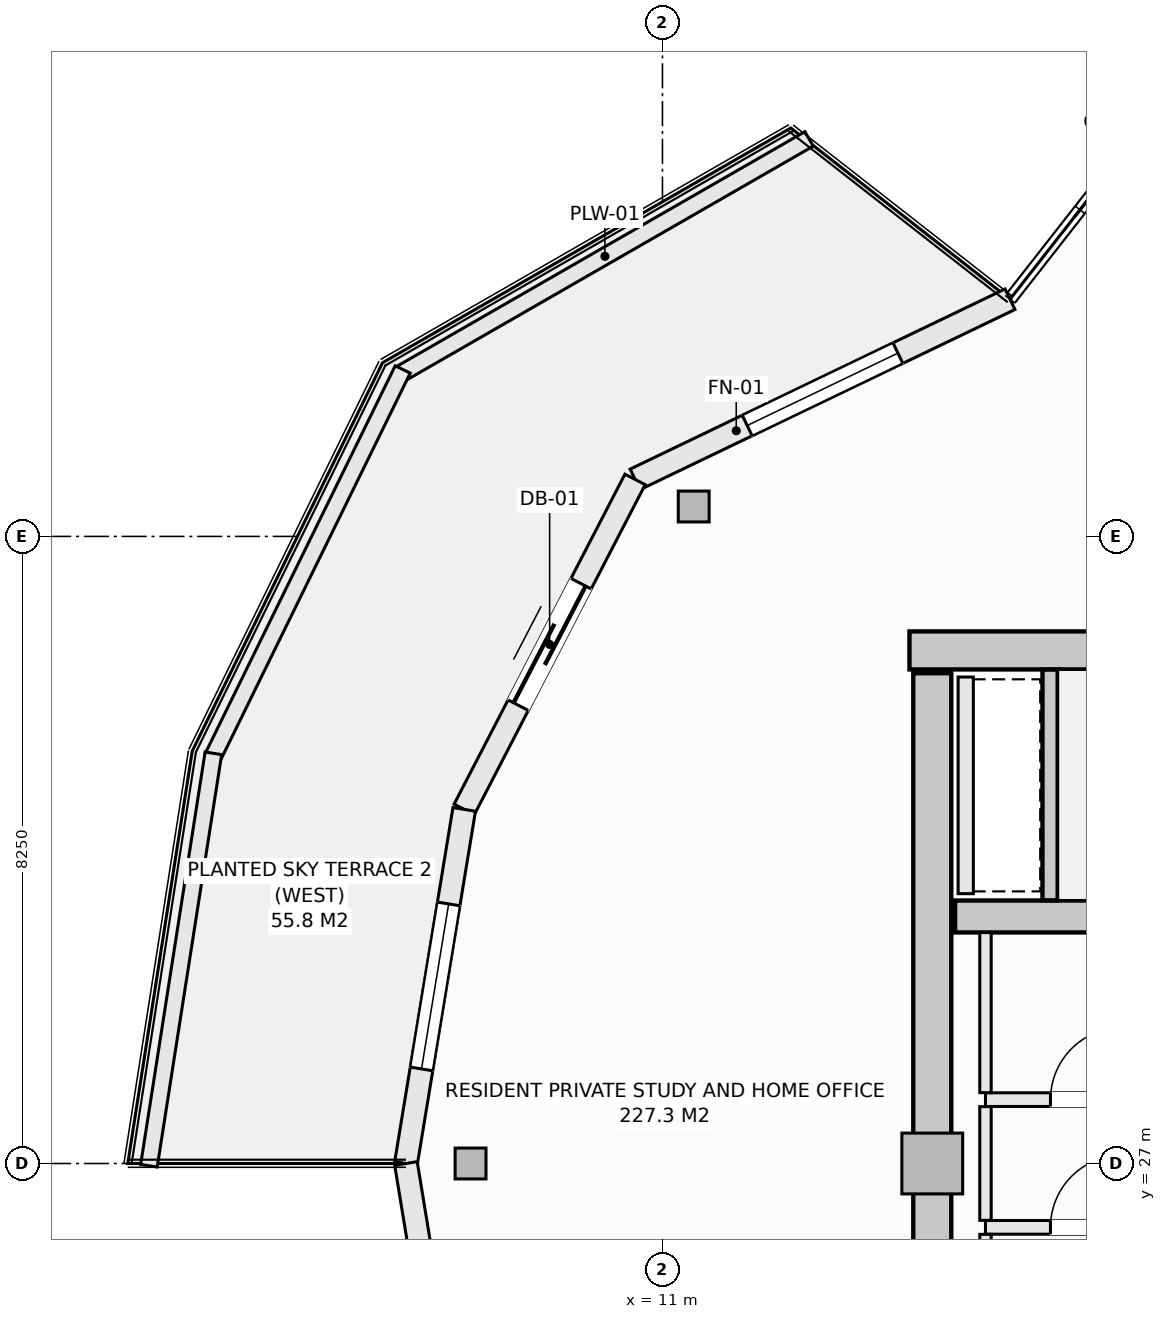
"""IFC4 building model, lengths in metres.
Left out: names, types, materials, properties, quantities, classifications, styles, units other than length and angle.
Written with IfcOpenShell. Run it as: python <this file> out.ifc"""

import sys

from ifc_helpers import new_model, si_unit, direction, frame, frame_2d, origin, origin_2d, place, context, subcontext, project, spatial, rectangle, hollow_rectangle, extrude, element, fill, save


model = new_model("IFC4")
c1 = context("Model", 3, precision=1e-05, world=origin(), true_north=direction((0.0, 1.0)))
c2 = subcontext(c1, "Body", "Model", "MODEL_VIEW")
j1 = project(units=[si_unit("LENGTHUNIT", "METRE"), si_unit("PLANEANGLEUNIT", "RADIAN")], contexts=[c1])
p1 = place(None, origin())
s1 = spatial("IfcSite", under=j1, at=p1, CompositionType="ELEMENT")
p2 = place(p1, origin())
s2 = spatial("IfcBuilding", under=s1, at=p2, CompositionType="ELEMENT")
p3 = place(p2, frame((0.0, 0.0, 245.9)))
s3 = spatial("IfcBuildingStorey", under=s2, at=p3, CompositionType="ELEMENT", Elevation=245.9)
p4 = place(p3, frame((14.25, 33.75, -0.27), z_axis=(0.0, 0.0, 1.0), x_axis=(1.0, 0.0, 0.0)))
e1 = element("IfcWall", 1, at=p4, inside=s3, PredefinedType="SHEAR", context=c2, shape_type="SweptSolid", body=[
    extrude(rectangle(XDim=13.5, YDim=0.5, at=frame_2d((6.75, 0.0))), origin(), (0.0, 0.0, 1.0), 3.3),
])
p5 = place(p3, frame((14.55, 20.55, -0.27), z_axis=(0.0, 0.0, 1.0), x_axis=(0.0, 1.0, 0.0)))
e2 = element("IfcWall", 2, at=p5, inside=s3, PredefinedType="SHEAR", context=c2, shape_type="SweptSolid", body=[
    extrude(rectangle(XDim=12.9, YDim=0.5, at=frame_2d((6.45, 0.0))), origin(), (0.0, 0.0, 1.0), 3.3),
])
p6 = place(p3, frame((14.85, 30.25, -0.27), z_axis=(0.0, 0.0, 1.0), x_axis=(1.0, 0.0, 0.0)))
e3 = element("IfcWall", 3, at=p6, inside=s3, PredefinedType="SHEAR", context=c2, shape_type="SweptSolid", body=[
    extrude(rectangle(XDim=7.3, YDim=0.42, at=frame_2d((3.65, 0.0))), origin(), (0.0, 0.0, 1.0), 3.3),
])
for number, where, z_axis, x_axis in (
    (4, (11.411, 35.644, -0.27), (0.0, 0.0, 1.0), (1.0, 0.0, 0.0)),
    (5, (8.475, 27.0, -0.27), (0.0, 0.0, 1.0), (1.0, 0.0, 0.0)),
):
    element("IfcColumn", number, at=place(p3, frame(where, z_axis=z_axis, x_axis=x_axis)), inside=s3, PredefinedType="COLUMN", context=c2, shape_type="SweptSolid", body=[
        extrude(hollow_rectangle(XDim=0.406, YDim=0.406, WallThickness=0.016, at=origin_2d()), origin(), (0.0, 0.0, 1.0), 3.3),
    ])
p7 = place(p3, frame((14.55, 27.0, -0.27), z_axis=(0.0, 0.0, 1.0), x_axis=(1.0, 0.0, 0.0)))
e6 = element("IfcColumn", 6, at=p7, inside=s3, PredefinedType="PILASTER", context=c2, shape_type="SweptSolid", body=[
    extrude(rectangle(XDim=0.8, YDim=0.8, at=origin_2d()), origin(), (0.0, 0.0, 1.0), 3.3),
])
p8 = place(p3, frame((10.639, 36.0, 0.0), z_axis=(0.0, 0.0, 1.0), x_axis=(0.901355238351, 0.433080517106, 0.0)))
e7 = element("IfcWall", 7, at=p8, inside=s3, PredefinedType="SOLIDWALL", context=c2, shape_type="SweptSolid", body=[
    extrude(rectangle(XDim=5.473, YDim=0.3, at=frame_2d((2.737, 0.0))), origin(), (0.0, 0.0, 1.0), 2.605),
])
p9 = place(p8, frame((1.637, 0.0, 0.72)))
e8 = element("IfcOpeningElement", 8, at=p9, cuts=e7, PredefinedType="OPENING", context=c2, shape_type="SweptSolid", body=[
    extrude(rectangle(XDim=2.2, YDim=1.65, at=frame_2d((1.1, 0.825))), frame((0.0, 0.16, 0.0), z_axis=(0.0, -1.0, 0.0), x_axis=(1.0, 0.0, 0.0)), (0.0, 0.0, 1.0), 0.32),
])
p10 = place(p3, frame((8.392, 31.659, 0.0), z_axis=(0.0, 0.0, 1.0), x_axis=(0.459793771602, 0.888025724625, 0.0)))
e9 = element("IfcWall", 9, at=p10, inside=s3, PredefinedType="SOLIDWALL", context=c2, shape_type="SweptSolid", body=[
    extrude(rectangle(XDim=4.889, YDim=0.3, at=frame_2d((2.444, 0.0))), origin(), (0.0, 0.0, 1.0), 2.605),
])
p11 = place(p10, frame((1.544, 0.0, 0.0)))
e10 = element("IfcOpeningElement", 10, at=p11, cuts=e9, PredefinedType="OPENING", context=c2, shape_type="SweptSolid", body=[
    extrude(rectangle(XDim=1.8, YDim=2.25, at=frame_2d((0.9, 1.125))), frame((0.0, 0.16, 0.0), z_axis=(0.0, -1.0, 0.0), x_axis=(1.0, 0.0, 0.0)), (0.0, 0.0, 1.0), 0.32),
])
p12 = place(p3, frame((7.625, 27.0, 0.0), z_axis=(0.0, 0.0, 1.0), x_axis=(0.162369371657, 0.986730047758, 0.0)))
e11 = element("IfcWall", 11, at=p12, inside=s3, PredefinedType="SOLIDWALL", context=c2, shape_type="SweptSolid", body=[
    extrude(rectangle(XDim=4.721, YDim=0.3, at=frame_2d((2.361, 0.0))), origin(), (0.0, 0.0, 1.0), 2.605),
])
p13 = place(p12, frame((1.261, 0.0, 0.72)))
e12 = element("IfcOpeningElement", 12, at=p13, cuts=e11, PredefinedType="OPENING", context=c2, shape_type="SweptSolid", body=[
    extrude(rectangle(XDim=2.2, YDim=1.65, at=frame_2d((1.1, 0.825))), frame((0.0, 0.16, 0.0), z_axis=(0.0, -1.0, 0.0), x_axis=(1.0, 0.0, 0.0)), (0.0, 0.0, 1.0), 0.32),
])
p14 = place(p3, frame((7.625, 27.0, 0.0), z_axis=(0.0, 0.0, 1.0), x_axis=(0.162369371657, -0.986730047758, 0.0)))
e13 = element("IfcWall", 13, at=p14, inside=s3, PredefinedType="SOLIDWALL", context=c2, shape_type="SweptSolid", body=[
    extrude(rectangle(XDim=4.721, YDim=0.3, at=frame_2d((2.361, 0.0))), origin(), (0.0, 0.0, 1.0), 2.605),
])
p15 = place(p14, frame((1.261, 0.0, 0.72)))
e14 = element("IfcOpeningElement", 14, at=p15, cuts=e13, PredefinedType="OPENING", context=c2, shape_type="SweptSolid", body=[
    extrude(rectangle(XDim=2.2, YDim=1.65, at=frame_2d((1.1, 0.825))), frame((0.0, 0.16, 0.0), z_axis=(0.0, -1.0, 0.0), x_axis=(1.0, 0.0, 0.0)), (0.0, 0.0, 1.0), 0.32),
])
p16 = place(p3, frame((7.557, 37.391, 0.0), z_axis=(0.0, 0.0, 1.0), x_axis=(0.866901621005, 0.49847926687, 0.0)))
e15 = element("IfcWall", 15, at=p16, inside=s3, PredefinedType="PARAPET", context=c2, shape_type="SweptSolid", body=[
    extrude(rectangle(XDim=6.197, YDim=0.22, at=frame_2d((3.098, 0.0))), origin(), (0.0, 0.0, 1.0), 0.52),
])
p17 = place(p3, frame((5.079, 32.338, 0.0), z_axis=(0.0, 0.0, 1.0), x_axis=(0.440058847499, 0.897968936399, 0.0)))
e16 = element("IfcWall", 16, at=p17, inside=s3, PredefinedType="PARAPET", context=c2, shape_type="SweptSolid", body=[
    extrude(rectangle(XDim=5.689, YDim=0.22, at=frame_2d((2.845, 0.0))), origin(), (0.0, 0.0, 1.0), 0.52),
])
p18 = place(p3, frame((4.243, 26.971, 0.0), z_axis=(0.0, 0.0, 1.0), x_axis=(0.154441975483, 0.988001860428, 0.0)))
e17 = element("IfcWall", 17, at=p18, inside=s3, PredefinedType="PARAPET", context=c2, shape_type="SweptSolid", body=[
    extrude(rectangle(XDim=5.492, YDim=0.22, at=frame_2d((2.746, 0.0))), origin(), (0.0, 0.0, 1.0), 0.52),
])
p19 = place(p3, frame((16.1, 30.462, -0.27), z_axis=(0.0, 0.0, 1.0), x_axis=(0.0, 1.0, 0.0)))
e18 = element("IfcWall", 18, at=p19, inside=s3, PredefinedType="SHEAR", context=c2, shape_type="SweptSolid", body=[
    extrude(rectangle(XDim=3.036, YDim=0.2, at=frame_2d((1.518, 0.0))), origin(), (0.0, 0.0, 1.0), 3.3),
])
p20 = place(p3, frame((14.99, 30.55, 0.0), z_axis=(0.0, 0.0, 1.0), x_axis=(0.0, 1.0, 0.0)))
e19 = element("IfcWall", 19, at=p20, inside=s3, PredefinedType="SOLIDWALL", context=c2, shape_type="SweptSolid", body=[
    extrude(rectangle(XDim=2.85, YDim=0.2, at=frame_2d((1.425, 0.0))), origin(), (0.0, 0.0, 1.0), 3.03),
])
p21 = place(p3, frame((15.25, 27.84, 0.0), z_axis=(0.0, 0.0, 1.0), x_axis=(1.0, 0.0, 0.0)))
e20 = element("IfcWall", 20, at=p21, inside=s3, PredefinedType="SOLIDWALL", context=c2, shape_type="SweptSolid", body=[
    extrude(rectangle(XDim=6.9, YDim=0.18, at=frame_2d((3.45, 0.0))), origin(), (0.0, 0.0, 1.0), 3.03),
])
p22 = place(p21, frame((5.02, 0.0, 0.0)))
e21 = element("IfcOpeningElement", 21, at=p22, cuts=e20, PredefinedType="OPENING", context=c2, shape_type="SweptSolid", body=[
    extrude(rectangle(XDim=0.95, YDim=2.1, at=frame_2d((0.475, 1.05))), frame((0.0, 0.1, 0.0), z_axis=(0.0, -1.0, 0.0), x_axis=(1.0, 0.0, 0.0)), (0.0, 0.0, 1.0), 0.2),
])
p23 = place(p21, frame((0.855, 0.0, 0.0)))
e22 = element("IfcOpeningElement", 22, at=p23, cuts=e20, PredefinedType="OPENING", context=c2, shape_type="SweptSolid", body=[
    extrude(rectangle(XDim=0.95, YDim=2.1, at=frame_2d((0.475, 1.05))), frame((0.0, 0.1, 0.0), z_axis=(0.0, -1.0, 0.0), x_axis=(1.0, 0.0, 0.0)), (0.0, 0.0, 1.0), 0.2),
])
p24 = place(p21, frame((2.9, 0.0, 0.0)))
e23 = element("IfcOpeningElement", 23, at=p24, cuts=e20, PredefinedType="OPENING", context=c2, shape_type="SweptSolid", body=[
    extrude(rectangle(XDim=0.95, YDim=2.1, at=frame_2d((0.475, 1.05))), frame((0.0, 0.1, 0.0), z_axis=(0.0, -1.0, 0.0), x_axis=(1.0, 0.0, 0.0)), (0.0, 0.0, 1.0), 0.2),
])
p25 = place(p3, frame((15.25, 26.16, 0.0), z_axis=(0.0, 0.0, 1.0), x_axis=(1.0, 0.0, 0.0)))
e24 = element("IfcWall", 24, at=p25, inside=s3, PredefinedType="SOLIDWALL", context=c2, shape_type="SweptSolid", body=[
    extrude(rectangle(XDim=6.9, YDim=0.18, at=frame_2d((3.45, 0.0))), origin(), (0.0, 0.0, 1.0), 3.03),
])
p26 = place(p25, frame((5.02, 0.0, 0.0)))
e25 = element("IfcOpeningElement", 25, at=p26, cuts=e24, PredefinedType="OPENING", context=c2, shape_type="SweptSolid", body=[
    extrude(rectangle(XDim=0.95, YDim=2.1, at=frame_2d((0.475, 1.05))), frame((0.0, 0.1, 0.0), z_axis=(0.0, -1.0, 0.0), x_axis=(1.0, 0.0, 0.0)), (0.0, 0.0, 1.0), 0.2),
])
p27 = place(p25, frame((0.855, 0.0, 0.0)))
e26 = element("IfcOpeningElement", 26, at=p27, cuts=e24, PredefinedType="OPENING", context=c2, shape_type="SweptSolid", body=[
    extrude(rectangle(XDim=0.95, YDim=2.1, at=frame_2d((0.475, 1.05))), frame((0.0, 0.1, 0.0), z_axis=(0.0, -1.0, 0.0), x_axis=(1.0, 0.0, 0.0)), (0.0, 0.0, 1.0), 0.2),
])
p28 = place(p25, frame((2.9, 0.0, 0.0)))
e27 = element("IfcOpeningElement", 27, at=p28, cuts=e24, PredefinedType="OPENING", context=c2, shape_type="SweptSolid", body=[
    extrude(rectangle(XDim=0.95, YDim=2.1, at=frame_2d((0.475, 1.05))), frame((0.0, 0.1, 0.0), z_axis=(0.0, -1.0, 0.0), x_axis=(1.0, 0.0, 0.0)), (0.0, 0.0, 1.0), 0.2),
])
p29 = place(p3, frame((15.25, 23.962, 0.0), z_axis=(0.0, 0.0, 1.0), x_axis=(0.0, 1.0, 0.0)))
e28 = element("IfcWall", 28, at=p29, inside=s3, PredefinedType="PARTITIONING", context=c2, shape_type="SweptSolid", body=[
    extrude(rectangle(XDim=2.106, YDim=0.15, at=frame_2d((1.053, 0.0))), origin(), (0.0, 0.0, 1.0), 3.03),
])
p30 = place(p3, frame((15.25, 26.252, 0.0), z_axis=(0.0, 0.0, 1.0), x_axis=(0.0, 1.0, 0.0)))
e29 = element("IfcWall", 29, at=p30, inside=s3, PredefinedType="PARTITIONING", context=c2, shape_type="SweptSolid", body=[
    extrude(rectangle(XDim=1.496, YDim=0.15, at=frame_2d((0.748, 0.0))), origin(), (0.0, 0.0, 1.0), 3.03),
])
p31 = place(p3, frame((15.25, 27.932, 0.0), z_axis=(0.0, 0.0, 1.0), x_axis=(0.0, 1.0, 0.0)))
e30 = element("IfcWall", 30, at=p31, inside=s3, PredefinedType="PARTITIONING", context=c2, shape_type="SweptSolid", body=[
    extrude(rectangle(XDim=2.106, YDim=0.15, at=frame_2d((1.053, 0.0))), origin(), (0.0, 0.0, 1.0), 3.03),
])
p32 = place(p9, origin())
e31 = element("IfcWindow", 31, at=p32, inside=s3, PartitioningType="SINGLE_PANEL", PredefinedType="WINDOW", context=c2, shape_type="SweptSolid", body=[
    extrude(rectangle(XDim=2.2, YDim=1.65, at=frame_2d((1.1, 0.825))), frame((0.0, 0.03, 0.0), z_axis=(0.0, -1.0, 0.0), x_axis=(1.0, 0.0, 0.0)), (0.0, 0.0, 1.0), 0.06),
])
fill(e8, e31)
p33 = place(p11, origin())
e32 = element("IfcDoor", 32, at=p33, inside=s3, OperationType="SLIDING_TO_LEFT", PredefinedType="DOOR", context=c2, shape_type="SweptSolid", body=[
    extrude(rectangle(XDim=1.8, YDim=2.25, at=frame_2d((0.9, 1.125))), frame((0.0, 0.025, 0.0), z_axis=(0.0, -1.0, 0.0), x_axis=(1.0, 0.0, 0.0)), (0.0, 0.0, 1.0), 0.05),
])
fill(e10, e32)
p34 = place(p13, origin())
e33 = element("IfcWindow", 33, at=p34, inside=s3, PartitioningType="SINGLE_PANEL", PredefinedType="WINDOW", context=c2, shape_type="SweptSolid", body=[
    extrude(rectangle(XDim=2.2, YDim=1.65, at=frame_2d((1.1, 0.825))), frame((0.0, 0.03, 0.0), z_axis=(0.0, -1.0, 0.0), x_axis=(1.0, 0.0, 0.0)), (0.0, 0.0, 1.0), 0.06),
])
fill(e12, e33)
p35 = place(p23, origin())
e34 = element("IfcDoor", 34, at=p35, inside=s3, OperationType="SINGLE_SWING_RIGHT", PredefinedType="DOOR", context=c2, shape_type="SweptSolid", body=[
    extrude(rectangle(XDim=0.95, YDim=2.1, at=frame_2d((0.475, 1.05))), frame((0.0, 0.025, 0.0), z_axis=(0.0, -1.0, 0.0), x_axis=(1.0, 0.0, 0.0)), (0.0, 0.0, 1.0), 0.05),
])
fill(e22, e34)
p36 = place(p27, origin())
e35 = element("IfcDoor", 35, at=p36, inside=s3, OperationType="SINGLE_SWING_RIGHT", PredefinedType="DOOR", context=c2, shape_type="SweptSolid", body=[
    extrude(rectangle(XDim=0.95, YDim=2.1, at=frame_2d((0.475, 1.05))), frame((0.0, 0.025, 0.0), z_axis=(0.0, -1.0, 0.0), x_axis=(1.0, 0.0, 0.0)), (0.0, 0.0, 1.0), 0.05),
])
fill(e26, e35)
save(model, sys.argv[1])
